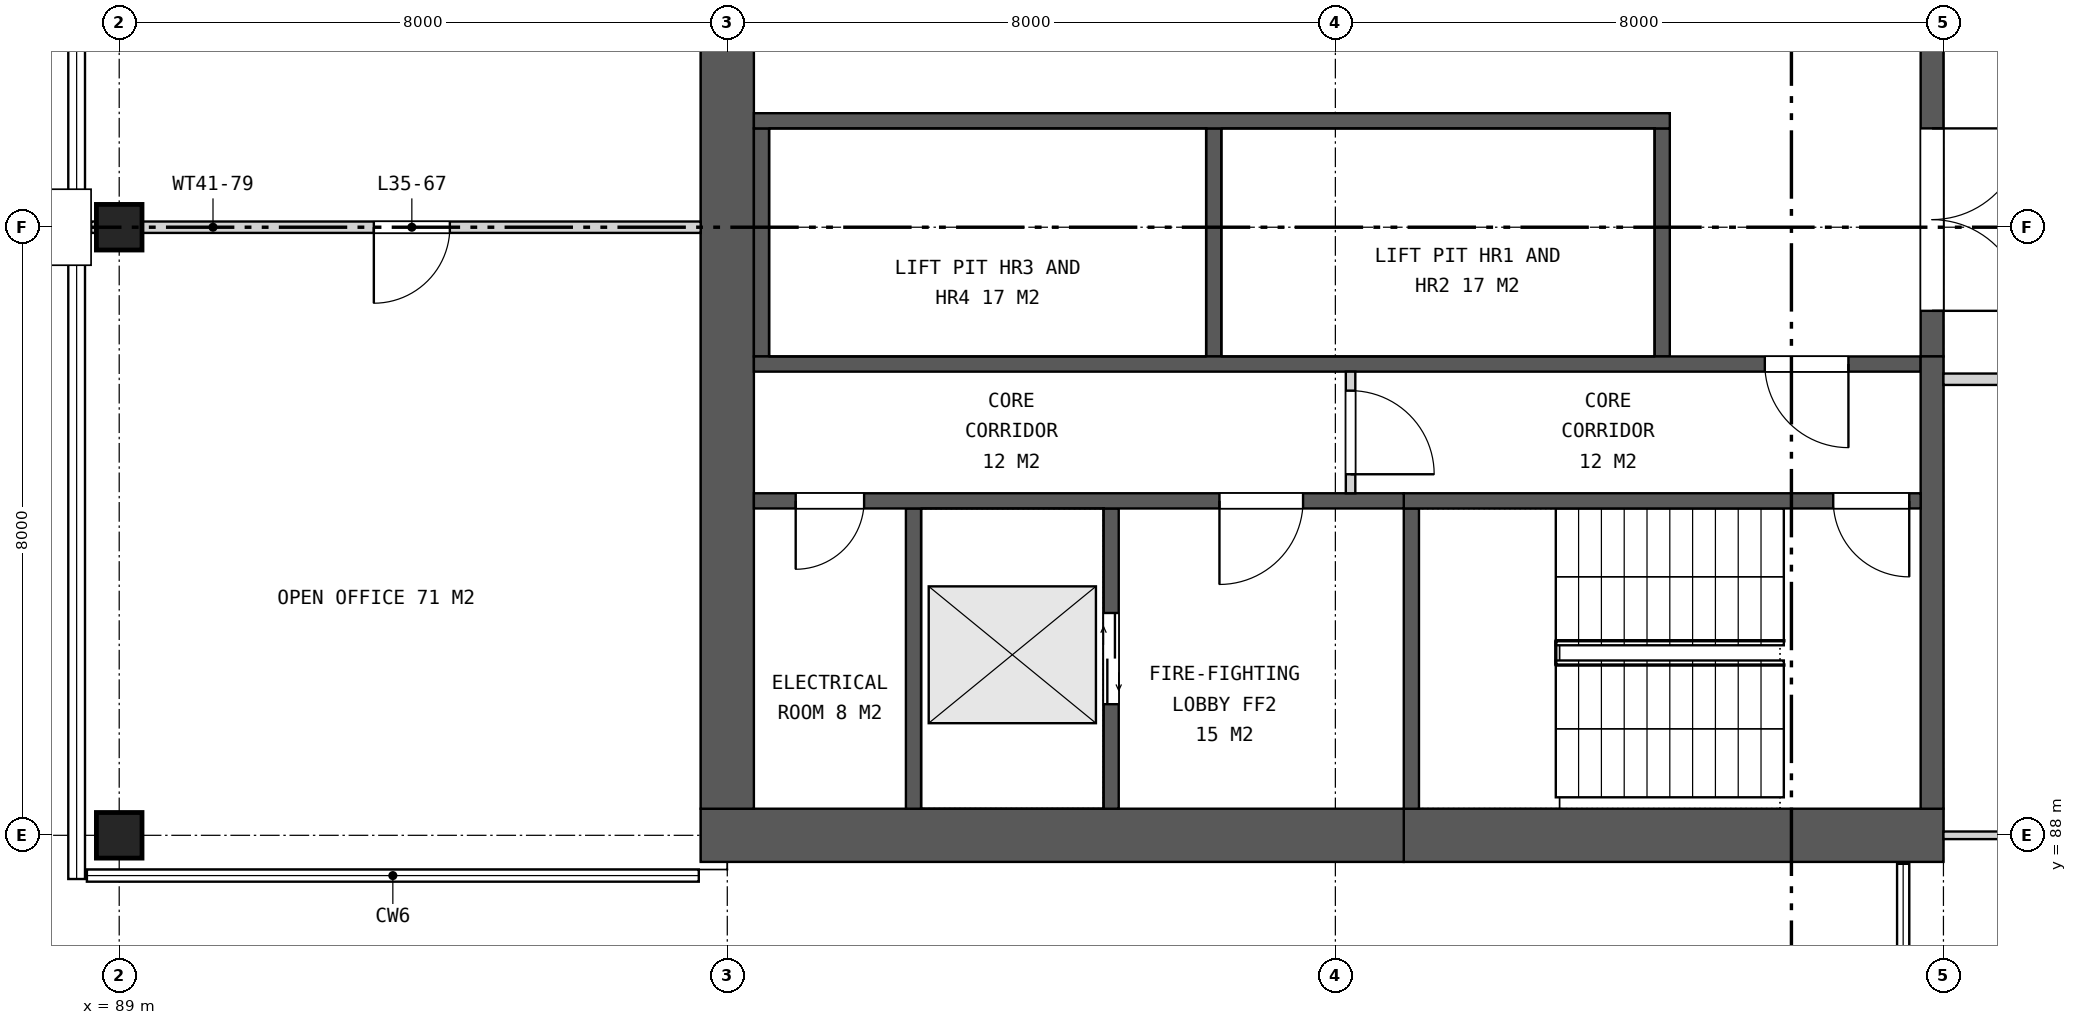
"""IFC4 building model, lengths in metres.
Left out: names, types, materials, properties, quantities, classifications, styles, units other than length and angle.
Written with IfcOpenShell. Run it as: python <this file> out.ifc"""

import sys

from ifc_helpers import new_model, si_unit, direction, frame, frame_2d, origin, origin_2d, place, context, subcontext, project, spatial, rectangle, extrude, element, fill, save


model = new_model("IFC4")
c1 = context("Model", 3, precision=1e-05, world=origin(), true_north=direction((0.0, 1.0)))
c2 = subcontext(c1, "Body", "Model", "MODEL_VIEW")
j1 = project(units=[si_unit("LENGTHUNIT", "METRE"), si_unit("PLANEANGLEUNIT", "RADIAN")], contexts=[c1])
p1 = place(None, origin())
s1 = spatial("IfcSite", under=j1, at=p1, CompositionType="ELEMENT")
p2 = place(p1, origin())
s2 = spatial("IfcBuilding", under=s1, at=p2, CompositionType="ELEMENT")
p3 = place(p2, frame((0.0, 0.0, 167.3)))
s3 = spatial("IfcBuildingStorey", under=s2, at=p3, CompositionType="ELEMENT", Elevation=167.3)
for number, where, z_axis, x_axis in (
    (1, (89.0, 88.0, 0.0), (0.0, 0.0, 1.0), (1.0, 0.0, 0.0)),
    (2, (89.0, 96.0, 0.0), (0.0, 0.0, 1.0), (1.0, 0.0, 0.0)),
):
    element("IfcColumn", number, at=place(p3, frame(where, z_axis=z_axis, x_axis=x_axis)), inside=s3, PredefinedType="COLUMN", context=c2, shape_type="SweptSolid", body=[
        extrude(rectangle(XDim=0.6, YDim=0.6, at=origin_2d()), origin(), (0.0, 0.0, 1.0), 4.2),
    ])
p4 = place(p3, frame((113.0, 88.0, 0.0), z_axis=(0.0, 0.0, 1.0), x_axis=(-1.0, 0.0, 0.0)))
e3 = element("IfcWall", 3, at=p4, inside=s3, PredefinedType="SHEAR", context=c2, shape_type="SweptSolid", body=[
    extrude(rectangle(XDim=7.1, YDim=0.7, at=frame_2d((3.55, 0.0))), origin(), (0.0, 0.0, 1.0), 4.2),
])
p5 = place(p3, frame((105.9, 88.0, 0.0), z_axis=(0.0, 0.0, 1.0), x_axis=(-1.0, 0.0, 0.0)))
e4 = element("IfcWall", 4, at=p5, inside=s3, PredefinedType="SHEAR", context=c2, shape_type="SweptSolid", body=[
    extrude(rectangle(XDim=9.25, YDim=0.7, at=frame_2d((4.625, 0.0))), origin(), (0.0, 0.0, 1.0), 4.2),
])
p6 = place(p3, frame((97.0, 111.65, 0.0), z_axis=(0.0, 0.0, 1.0), x_axis=(0.0, -1.0, 0.0)))
e5 = element("IfcWall", 5, at=p6, inside=s3, PredefinedType="SHEAR", context=c2, shape_type="SweptSolid", body=[
    extrude(rectangle(XDim=23.3, YDim=0.7, at=frame_2d((11.65, 0.0))), origin(), (0.0, 0.0, 1.0), 4.2),
])
p7 = place(p6, frame((10.45, 0.0, 0.0)))
e6 = element("IfcOpeningElement", 6, at=p7, cuts=e5, PredefinedType="OPENING", context=c2, shape_type="SweptSolid", body=[
    extrude(rectangle(XDim=2.4, YDim=2.4, at=frame_2d((1.2, 1.2))), frame((0.0, 0.36, 0.0), z_axis=(0.0, -1.0, 0.0), x_axis=(1.0, 0.0, 0.0)), (0.0, 0.0, 1.0), 0.72),
])
p8 = place(p3, frame((112.85, 105.7, 0.0), z_axis=(0.0, 0.0, 1.0), x_axis=(0.0, -1.0, 0.0)))
e7 = element("IfcWall", 7, at=p8, inside=s3, PredefinedType="SHEAR", context=c2, shape_type="SweptSolid", body=[
    extrude(rectangle(XDim=11.4, YDim=0.3, at=frame_2d((5.7, 0.0))), origin(), (0.0, 0.0, 1.0), 4.2),
])
p9 = place(p8, frame((0.6, 0.0, 0.0)))
e8 = element("IfcOpeningElement", 8, at=p9, cuts=e7, PredefinedType="OPENING", context=c2, shape_type="SweptSolid", body=[
    extrude(rectangle(XDim=2.4, YDim=2.4, at=frame_2d((1.2, 1.2))), frame((0.0, 0.16, 0.0), z_axis=(0.0, -1.0, 0.0), x_axis=(1.0, 0.0, 0.0)), (0.0, 0.0, 1.0), 0.32),
])
p10 = place(p8, frame((4.5, 0.0, 0.0)))
e9 = element("IfcOpeningElement", 9, at=p10, cuts=e7, PredefinedType="OPENING", context=c2, shape_type="SweptSolid", body=[
    extrude(rectangle(XDim=2.4, YDim=2.4, at=frame_2d((1.2, 1.2))), frame((0.0, 0.16, 0.0), z_axis=(0.0, -1.0, 0.0), x_axis=(1.0, 0.0, 0.0)), (0.0, 0.0, 1.0), 0.32),
])
p11 = place(p8, frame((8.4, 0.0, 0.0)))
e10 = element("IfcOpeningElement", 10, at=p11, cuts=e7, PredefinedType="OPENING", context=c2, shape_type="SweptSolid", body=[
    extrude(rectangle(XDim=2.4, YDim=2.4, at=frame_2d((1.2, 1.2))), frame((0.0, 0.16, 0.0), z_axis=(0.0, -1.0, 0.0), x_axis=(1.0, 0.0, 0.0)), (0.0, 0.0, 1.0), 0.32),
])
for number, where, z_axis, x_axis in (
    (11, (109.3, 97.3, 0.0), (0.0, 0.0, 1.0), (0.0, -1.0, 0.0)),
    (12, (103.4, 97.3, 0.0), (0.0, 0.0, 1.0), (0.0, -1.0, 0.0)),
    (13, (97.45, 97.3, 0.0), (0.0, 0.0, 1.0), (0.0, -1.0, 0.0)),
):
    element("IfcWall", number, at=place(p3, frame(where, z_axis=z_axis, x_axis=x_axis)), inside=s3, PredefinedType="SHEAR", context=c2, shape_type="SweptSolid", body=[
        extrude(rectangle(XDim=3.0, YDim=0.2, at=frame_2d((1.5, 0.0))), origin(), (0.0, 0.0, 1.0), 4.2),
    ])
p12 = place(p3, frame((109.4, 97.4, 0.0), z_axis=(0.0, 0.0, 1.0), x_axis=(-1.0, 0.0, 0.0)))
e14 = element("IfcWall", 14, at=p12, inside=s3, PredefinedType="SHEAR", context=c2, shape_type="SweptSolid", body=[
    extrude(rectangle(XDim=12.05, YDim=0.2, at=frame_2d((6.025, 0.0))), origin(), (0.0, 0.0, 1.0), 4.2),
])
p13 = place(p3, frame((112.7, 94.2, 0.0), z_axis=(0.0, 0.0, 1.0), x_axis=(-1.0, 0.0, 0.0)))
e15 = element("IfcWall", 15, at=p13, inside=s3, PredefinedType="SHEAR", context=c2, shape_type="SweptSolid", body=[
    extrude(rectangle(XDim=15.35, YDim=0.2, at=frame_2d((7.675, 0.0))), origin(), (0.0, 0.0, 1.0), 4.2),
])
p14 = place(p13, frame((0.95, 0.0, 0.0)))
e16 = element("IfcOpeningElement", 16, at=p14, cuts=e15, PredefinedType="OPENING", context=c2, shape_type="SweptSolid", body=[
    extrude(rectangle(XDim=1.1, YDim=2.1, at=frame_2d((0.55, 1.05))), frame((0.0, 0.11, 0.0), z_axis=(0.0, -1.0, 0.0), x_axis=(1.0, 0.0, 0.0)), (0.0, 0.0, 1.0), 0.22),
])
p15 = place(p3, frame((112.85, 94.3, 0.0), z_axis=(0.0, 0.0, 1.0), x_axis=(0.0, -1.0, 0.0)))
e17 = element("IfcWall", 17, at=p15, inside=s3, PredefinedType="SHEAR", context=c2, shape_type="SweptSolid", body=[
    extrude(rectangle(XDim=5.95, YDim=0.3, at=frame_2d((2.975, 0.0))), origin(), (0.0, 0.0, 1.0), 4.2),
])
p16 = place(p3, frame((106.0, 92.3, 0.0), z_axis=(0.0, 0.0, 1.0), x_axis=(0.0, -1.0, 0.0)))
e18 = element("IfcWall", 18, at=p16, inside=s3, PredefinedType="SHEAR", context=c2, shape_type="SweptSolid", body=[
    extrude(rectangle(XDim=3.95, YDim=0.2, at=frame_2d((1.975, 0.0))), origin(), (0.0, 0.0, 1.0), 4.2),
])
p17 = place(p3, frame((102.05, 92.3, 0.0), z_axis=(0.0, 0.0, 1.0), x_axis=(0.0, -1.0, 0.0)))
e19 = element("IfcWall", 19, at=p17, inside=s3, PredefinedType="SHEAR", context=c2, shape_type="SweptSolid", body=[
    extrude(rectangle(XDim=3.95, YDim=0.2, at=frame_2d((1.975, 0.0))), origin(), (0.0, 0.0, 1.0), 4.2),
])
p18 = place(p17, frame((1.375, 0.0, 0.0)))
e20 = element("IfcOpeningElement", 20, at=p18, cuts=e19, PredefinedType="OPENING", context=c2, shape_type="SweptSolid", body=[
    extrude(rectangle(XDim=1.2, YDim=2.1, at=frame_2d((0.6, 1.05))), frame((0.0, 0.11, 0.0), z_axis=(0.0, -1.0, 0.0), x_axis=(1.0, 0.0, 0.0)), (0.0, 0.0, 1.0), 0.22),
])
p19 = place(p3, frame((99.45, 92.3, 0.0), z_axis=(0.0, 0.0, 1.0), x_axis=(0.0, -1.0, 0.0)))
e21 = element("IfcWall", 21, at=p19, inside=s3, PredefinedType="SHEAR", context=c2, shape_type="SweptSolid", body=[
    extrude(rectangle(XDim=3.95, YDim=0.2, at=frame_2d((1.975, 0.0))), origin(), (0.0, 0.0, 1.0), 4.2),
])
p20 = place(p3, frame((112.7, 92.4, 0.0), z_axis=(0.0, 0.0, 1.0), x_axis=(-1.0, 0.0, 0.0)))
e22 = element("IfcWall", 22, at=p20, inside=s3, PredefinedType="SHEAR", context=c2, shape_type="SweptSolid", body=[
    extrude(rectangle(XDim=6.8, YDim=0.2, at=frame_2d((3.4, 0.0))), origin(), (0.0, 0.0, 1.0), 4.2),
])
p21 = place(p20, frame((0.15, 0.0, 0.0)))
e23 = element("IfcOpeningElement", 23, at=p21, cuts=e22, PredefinedType="OPENING", context=c2, shape_type="SweptSolid", body=[
    extrude(rectangle(XDim=1.0, YDim=2.1, at=frame_2d((0.5, 1.05))), frame((0.0, 0.11, 0.0), z_axis=(0.0, -1.0, 0.0), x_axis=(1.0, 0.0, 0.0)), (0.0, 0.0, 1.0), 0.22),
])
p22 = place(p3, frame((105.9, 92.4, 0.0), z_axis=(0.0, 0.0, 1.0), x_axis=(-1.0, 0.0, 0.0)))
e24 = element("IfcWall", 24, at=p22, inside=s3, PredefinedType="SHEAR", context=c2, shape_type="SweptSolid", body=[
    extrude(rectangle(XDim=8.55, YDim=0.2, at=frame_2d((4.275, 0.0))), origin(), (0.0, 0.0, 1.0), 4.2),
])
p23 = place(p22, frame((1.325, 0.0, 0.0)))
e25 = element("IfcOpeningElement", 25, at=p23, cuts=e24, PredefinedType="OPENING", context=c2, shape_type="SweptSolid", body=[
    extrude(rectangle(XDim=1.1, YDim=2.1, at=frame_2d((0.55, 1.05))), frame((0.0, 0.11, 0.0), z_axis=(0.0, -1.0, 0.0), x_axis=(1.0, 0.0, 0.0)), (0.0, 0.0, 1.0), 0.22),
])
p24 = place(p22, frame((7.1, 0.0, 0.0)))
e26 = element("IfcOpeningElement", 26, at=p24, cuts=e24, PredefinedType="OPENING", context=c2, shape_type="SweptSolid", body=[
    extrude(rectangle(XDim=0.9, YDim=2.1, at=frame_2d((0.45, 1.05))), frame((0.0, 0.11, 0.0), z_axis=(0.0, -1.0, 0.0), x_axis=(1.0, 0.0, 0.0)), (0.0, 0.0, 1.0), 0.22),
])
p25 = place(p3, frame((105.2, 94.1, 0.0), z_axis=(0.0, 0.0, 1.0), x_axis=(0.0, -1.0, 0.0)))
e27 = element("IfcWall", 27, at=p25, inside=s3, PredefinedType="PARTITIONING", context=c2, shape_type="SweptSolid", body=[
    extrude(rectangle(XDim=1.6, YDim=0.125, at=frame_2d((0.8, 0.0))), origin(), (0.0, 0.0, 1.0), 4.2),
])
p26 = place(p25, frame((0.25, 0.0, 0.0)))
e28 = element("IfcOpeningElement", 28, at=p26, cuts=e27, PredefinedType="OPENING", context=c2, shape_type="SweptSolid", body=[
    extrude(rectangle(XDim=1.1, YDim=2.1, at=frame_2d((0.55, 1.05))), frame((0.0, 0.073, 0.0), z_axis=(0.0, -1.0, 0.0), x_axis=(1.0, 0.0, 0.0)), (0.0, 0.0, 1.0), 0.145),
])
p27 = place(p3, frame((113.0, 88.0, 0.0), z_axis=(0.0, 0.0, 1.0), x_axis=(1.0, 0.0, 0.0)))
e29 = element("IfcWall", 29, at=p27, inside=s3, PredefinedType="PARTITIONING", context=c2, shape_type="SweptSolid", body=[
    extrude(rectangle(XDim=10.725, YDim=0.1, at=frame_2d((5.363, 0.0))), origin(), (0.0, 0.0, 1.0), 3.26),
])
p28 = place(p3, frame((113.0, 94.0, 0.0), z_axis=(0.0, 0.0, 1.0), x_axis=(1.0, 0.0, 0.0)))
e30 = element("IfcWall", 30, at=p28, inside=s3, PredefinedType="PARTITIONING", context=c2, shape_type="SweptSolid", body=[
    extrude(rectangle(XDim=10.725, YDim=0.15, at=frame_2d((5.363, 0.0))), origin(), (0.0, 0.0, 1.0), 3.26),
])
p29 = place(p3, frame((88.63, 96.0, 0.0), z_axis=(0.0, 0.0, 1.0), x_axis=(1.0, 0.0, 0.0)))
e31 = element("IfcWall", 31, at=p29, inside=s3, PredefinedType="PARTITIONING", context=c2, shape_type="SweptSolid", body=[
    extrude(rectangle(XDim=8.02, YDim=0.15, at=frame_2d((4.01, 0.0))), origin(), (0.0, 0.0, 1.0), 3.26),
])
p30 = place(p29, frame((3.72, 0.0, 0.0)))
e32 = element("IfcOpeningElement", 32, at=p30, cuts=e31, PredefinedType="OPENING", context=c2, shape_type="SweptSolid", body=[
    extrude(rectangle(XDim=1.0, YDim=2.1, at=frame_2d((0.5, 1.05))), frame((0.0, 0.085, 0.0), z_axis=(0.0, -1.0, 0.0), x_axis=(1.0, 0.0, 0.0)), (0.0, 0.0, 1.0), 0.17),
])
p31 = place(p11, origin())
e33 = element("IfcDoor", 33, at=p31, inside=s3, OperationType="DOUBLE_DOOR_SINGLE_SWING", PredefinedType="DOOR", context=c2, shape_type="SweptSolid", body=[
    extrude(rectangle(XDim=2.4, YDim=2.4, at=frame_2d((1.2, 1.2))), frame((0.0, 0.025, 0.0), z_axis=(0.0, -1.0, 0.0), x_axis=(1.0, 0.0, 0.0)), (0.0, 0.0, 1.0), 0.05),
])
fill(e10, e33)
p32 = place(p14, origin())
e34 = element("IfcDoor", 34, at=p32, inside=s3, OperationType="SINGLE_SWING_LEFT", PredefinedType="DOOR", context=c2, shape_type="SweptSolid", body=[
    extrude(rectangle(XDim=1.1, YDim=2.1, at=frame_2d((0.55, 1.05))), frame((0.0, 0.025, 0.0), z_axis=(0.0, -1.0, 0.0), x_axis=(1.0, 0.0, 0.0)), (0.0, 0.0, 1.0), 0.05),
])
fill(e16, e34)
p33 = place(p18, origin())
e35 = element("IfcDoor", 35, at=p33, inside=s3, OperationType="DOUBLE_DOOR_SLIDING", PredefinedType="DOOR", context=c2, shape_type="SweptSolid", body=[
    extrude(rectangle(XDim=1.2, YDim=2.1, at=frame_2d((0.6, 1.05))), frame((0.0, 0.025, 0.0), z_axis=(0.0, -1.0, 0.0), x_axis=(1.0, 0.0, 0.0)), (0.0, 0.0, 1.0), 0.05),
])
fill(e20, e35)
p34 = place(p21, origin())
e36 = element("IfcDoor", 36, at=p34, inside=s3, OperationType="SINGLE_SWING_LEFT", PredefinedType="DOOR", context=c2, shape_type="SweptSolid", body=[
    extrude(rectangle(XDim=1.0, YDim=2.1, at=frame_2d((0.5, 1.05))), frame((0.0, 0.025, 0.0), z_axis=(0.0, -1.0, 0.0), x_axis=(1.0, 0.0, 0.0)), (0.0, 0.0, 1.0), 0.05),
])
fill(e23, e36)
p35 = place(p23, origin())
e37 = element("IfcDoor", 37, at=p35, inside=s3, OperationType="SINGLE_SWING_RIGHT", PredefinedType="DOOR", context=c2, shape_type="SweptSolid", body=[
    extrude(rectangle(XDim=1.1, YDim=2.1, at=frame_2d((0.55, 1.05))), frame((0.0, 0.025, 0.0), z_axis=(0.0, -1.0, 0.0), x_axis=(1.0, 0.0, 0.0)), (0.0, 0.0, 1.0), 0.05),
])
fill(e25, e37)
p36 = place(p24, origin())
e38 = element("IfcDoor", 38, at=p36, inside=s3, OperationType="SINGLE_SWING_RIGHT", PredefinedType="DOOR", context=c2, shape_type="SweptSolid", body=[
    extrude(rectangle(XDim=0.9, YDim=2.1, at=frame_2d((0.45, 1.05))), frame((0.0, 0.025, 0.0), z_axis=(0.0, -1.0, 0.0), x_axis=(1.0, 0.0, 0.0)), (0.0, 0.0, 1.0), 0.05),
])
fill(e26, e38)
p37 = place(p26, origin())
e39 = element("IfcDoor", 39, at=p37, inside=s3, OperationType="SINGLE_SWING_RIGHT", PredefinedType="DOOR", context=c2, shape_type="SweptSolid", body=[
    extrude(rectangle(XDim=1.1, YDim=2.1, at=frame_2d((0.55, 1.05))), frame((0.0, 0.025, 0.0), z_axis=(0.0, -1.0, 0.0), x_axis=(1.0, 0.0, 0.0)), (0.0, 0.0, 1.0), 0.05),
])
fill(e28, e39)
p38 = place(p30, frame((1.0, 0.0, 0.0), z_axis=(0.0, 0.0, 1.0), x_axis=(-1.0, 0.0, 0.0)))
e40 = element("IfcDoor", 40, at=p38, inside=s3, OperationType="SINGLE_SWING_RIGHT", PredefinedType="DOOR", context=c2, shape_type="SweptSolid", body=[
    extrude(rectangle(XDim=1.0, YDim=2.1, at=frame_2d((0.5, 1.05))), frame((0.0, 0.025, 0.0), z_axis=(0.0, -1.0, 0.0), x_axis=(1.0, 0.0, 0.0)), (0.0, 0.0, 1.0), 0.05),
])
fill(e32, e40)
save(model, sys.argv[1])
